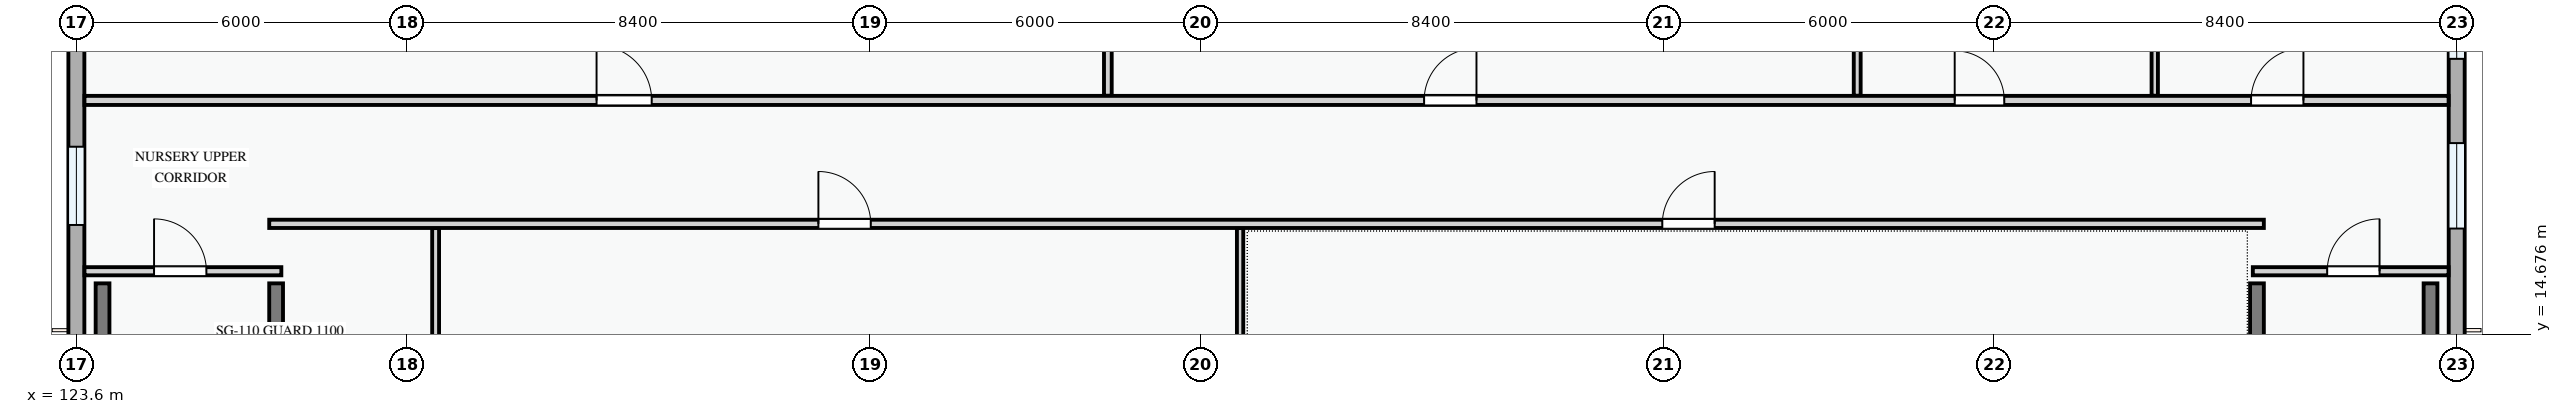
"""IFC4 building model, lengths in metres.
Left out: names, types, materials, properties, quantities, classifications, styles, units other than length and angle.
Written with IfcOpenShell. Run it as: python <this file> out.ifc"""

import sys

from ifc_helpers import new_model, si_unit, direction, frame, frame_2d, origin, place, context, subcontext, project, spatial, rectangle, extrude, element, fill, save


model = new_model("IFC4")
c1 = context("Model", 3, precision=1e-05, world=origin(), true_north=direction((0.0, 1.0)))
c2 = subcontext(c1, "Body", "Model", "MODEL_VIEW")
j1 = project(units=[si_unit("LENGTHUNIT", "METRE"), si_unit("PLANEANGLEUNIT", "RADIAN")], contexts=[c1])
p1 = place(None, origin())
s1 = spatial("IfcSite", under=j1, at=p1, CompositionType="ELEMENT")
p2 = place(p1, origin())
s2 = spatial("IfcBuilding", under=s1, at=p2, CompositionType="ELEMENT")
p3 = place(p2, frame((0.0, 0.0, 4.5)))
s3 = spatial("IfcBuildingStorey", under=s2, at=p3, CompositionType="ELEMENT", Elevation=4.5)
p4 = place(p3, frame((166.8, 14.4, 0.0), z_axis=(0.0, 0.0, 1.0), x_axis=(0.0, 1.0, 0.0)))
e1 = element("IfcWall", 1, at=p4, inside=s3, PredefinedType="STANDARD", context=c2, shape_type="SweptSolid", body=[
    extrude(rectangle(XDim=8.4, YDim=0.29, at=frame_2d((4.2, 0.0))), origin(), (0.0, 0.0, 1.0), 2.725),
])
p5 = place(p4, frame((2.195, 0.0, 0.72)))
e2 = element("IfcOpeningElement", 2, at=p5, cuts=e1, PredefinedType="OPENING", context=c2, shape_type="SweptSolid", body=[
    extrude(rectangle(XDim=1.55, YDim=1.4, at=frame_2d((0.775, 0.7))), frame((0.0, 0.155, 0.0), z_axis=(0.0, -1.0, 0.0), x_axis=(1.0, 0.0, 0.0)), (0.0, 0.0, 1.0), 0.31),
])
p6 = place(p4, frame((5.275, 0.0, 0.72)))
e3 = element("IfcOpeningElement", 3, at=p6, cuts=e1, PredefinedType="OPENING", context=c2, shape_type="SweptSolid", body=[
    extrude(rectangle(XDim=2.18, YDim=1.48, at=frame_2d((1.09, 0.74))), frame((0.0, 0.155, 0.0), z_axis=(0.0, -1.0, 0.0), x_axis=(1.0, 0.0, 0.0)), (0.0, 0.0, 1.0), 0.31),
])
p7 = place(p3, frame((123.6, 22.8, 0.0), z_axis=(0.0, 0.0, 1.0), x_axis=(0.0, -1.0, 0.0)))
e4 = element("IfcWall", 4, at=p7, inside=s3, PredefinedType="STANDARD", context=c2, shape_type="SweptSolid", body=[
    extrude(rectangle(XDim=8.4, YDim=0.29, at=frame_2d((4.2, 0.0))), origin(), (0.0, 0.0, 1.0), 2.725),
])
p8 = place(p7, frame((1.485, 0.0, 0.72)))
e5 = element("IfcOpeningElement", 5, at=p8, cuts=e4, PredefinedType="OPENING", context=c2, shape_type="SweptSolid", body=[
    extrude(rectangle(XDim=1.1, YDim=1.3, at=frame_2d((0.55, 0.65))), frame((0.0, 0.155, 0.0), z_axis=(0.0, -1.0, 0.0), x_axis=(1.0, 0.0, 0.0)), (0.0, 0.0, 1.0), 0.31),
])
p9 = place(p7, frame((4.72, 0.0, 0.72)))
e6 = element("IfcOpeningElement", 6, at=p9, cuts=e4, PredefinedType="OPENING", context=c2, shape_type="SweptSolid", body=[
    extrude(rectangle(XDim=1.42, YDim=1.38, at=frame_2d((0.71, 0.69))), frame((0.0, 0.155, 0.0), z_axis=(0.0, -1.0, 0.0), x_axis=(1.0, 0.0, 0.0)), (0.0, 0.0, 1.0), 0.31),
])
for number, where, z_axis, x_axis in (
    (7, (124.075, 15.6, 0.0), (0.0, 0.0, 1.0), (0.0, -1.0, 0.0)),
    (8, (127.225, 15.6, 0.0), (0.0, 0.0, 1.0), (0.0, -1.0, 0.0)),
    (9, (163.175, 15.6, 0.0), (0.0, 0.0, 1.0), (0.0, -1.0, 0.0)),
    (10, (166.325, 15.6, 0.0), (0.0, 0.0, 1.0), (0.0, -1.0, 0.0)),
):
    element("IfcWall", number, at=place(p3, frame(where, z_axis=z_axis, x_axis=x_axis)), inside=s3, PredefinedType="SHEAR", context=c2, shape_type="SweptSolid", body=[
        extrude(rectangle(XDim=6.7, YDim=0.25, at=frame_2d((3.35, 0.0))), origin(), (0.0, 0.0, 1.0), 3.3),
    ])
p10 = place(p3, frame((130.12, 8.547, 0.0), z_axis=(0.0, 0.0, 1.0), x_axis=(0.0, 1.0, 0.0)))
e11 = element("IfcWall", 11, at=p10, inside=s3, PredefinedType="PARTITIONING", context=c2, shape_type="SweptSolid", body=[
    extrude(rectangle(XDim=8.056, YDim=0.125, at=frame_2d((4.028, 0.0))), origin(), (0.0, 0.0, 1.0), 3.3),
])
p11 = place(p3, frame((144.72, 8.547, 0.0), z_axis=(0.0, 0.0, 1.0), x_axis=(0.0, 1.0, 0.0)))
e12 = element("IfcWall", 12, at=p11, inside=s3, PredefinedType="PARTITIONING", context=c2, shape_type="SweptSolid", body=[
    extrude(rectangle(XDim=8.056, YDim=0.115, at=frame_2d((4.028, 0.0))), origin(), (0.0, 0.0, 1.0), 3.3),
])
p12 = place(p3, frame((142.32, 19.004, 0.0), z_axis=(0.0, 0.0, 1.0), x_axis=(0.0, 1.0, 0.0)))
e13 = element("IfcWall", 13, at=p12, inside=s3, PredefinedType="PARTITIONING", context=c2, shape_type="SweptSolid", body=[
    extrude(rectangle(XDim=9.736, YDim=0.14, at=frame_2d((4.868, 0.0))), origin(), (0.0, 0.0, 1.0), 3.3),
])
p13 = place(p3, frame((155.92, 19.004, 0.0), z_axis=(0.0, 0.0, 1.0), x_axis=(0.0, 1.0, 0.0)))
e14 = element("IfcWall", 14, at=p13, inside=s3, PredefinedType="PARTITIONING", context=c2, shape_type="SweptSolid", body=[
    extrude(rectangle(XDim=9.736, YDim=0.125, at=frame_2d((4.868, 0.0))), origin(), (0.0, 0.0, 1.0), 3.3),
])
p14 = place(p3, frame((161.32, 19.004, 0.0), z_axis=(0.0, 0.0, 1.0), x_axis=(0.0, 1.0, 0.0)))
e15 = element("IfcWall", 15, at=p14, inside=s3, PredefinedType="PARTITIONING", context=c2, shape_type="SweptSolid", body=[
    extrude(rectangle(XDim=9.649, YDim=0.115, at=frame_2d((4.824, 0.0))), origin(), (0.0, 0.0, 1.0), 3.3),
])
p15 = place(p3, frame((127.1, 16.68, 0.0), z_axis=(0.0, 0.0, 1.0), x_axis=(1.0, 0.0, 0.0)))
e16 = element("IfcWall", 16, at=p15, inside=s3, PredefinedType="PARTITIONING", context=c2, shape_type="SweptSolid", body=[
    extrude(rectangle(XDim=36.2, YDim=0.15, at=frame_2d((18.1, 0.0))), origin(), (0.0, 0.0, 1.0), 3.3),
])
p16 = place(p15, frame((9.967, 0.0, 0.0)))
e17 = element("IfcOpeningElement", 17, at=p16, cuts=e16, PredefinedType="OPENING", context=c2, shape_type="SweptSolid", body=[
    extrude(rectangle(XDim=0.95, YDim=2.1, at=frame_2d((0.475, 1.05))), frame((0.0, 0.085, 0.0), z_axis=(0.0, -1.0, 0.0), x_axis=(1.0, 0.0, 0.0)), (0.0, 0.0, 1.0), 0.17),
])
p17 = place(p15, frame((25.283, 0.0, 0.0)))
e18 = element("IfcOpeningElement", 18, at=p17, cuts=e16, PredefinedType="OPENING", context=c2, shape_type="SweptSolid", body=[
    extrude(rectangle(XDim=0.95, YDim=2.1, at=frame_2d((0.475, 1.05))), frame((0.0, 0.085, 0.0), z_axis=(0.0, -1.0, 0.0), x_axis=(1.0, 0.0, 0.0)), (0.0, 0.0, 1.0), 0.17),
])
p18 = place(p3, frame((123.747, 18.92, 0.0), z_axis=(0.0, 0.0, 1.0), x_axis=(1.0, 0.0, 0.0)))
e19 = element("IfcWall", 19, at=p18, inside=s3, PredefinedType="PARTITIONING", context=c2, shape_type="SweptSolid", body=[
    extrude(rectangle(XDim=42.906, YDim=0.165, at=frame_2d((21.453, 0.0))), origin(), (0.0, 0.0, 1.0), 3.3),
])
p19 = place(p18, frame((9.294, 0.0, 0.0)))
e20 = element("IfcOpeningElement", 20, at=p19, cuts=e19, PredefinedType="OPENING", context=c2, shape_type="SweptSolid", body=[
    extrude(rectangle(XDim=1.0, YDim=2.1, at=frame_2d((0.5, 1.05))), frame((0.0, 0.093, 0.0), z_axis=(0.0, -1.0, 0.0), x_axis=(1.0, 0.0, 0.0)), (0.0, 0.0, 1.0), 0.185),
])
p20 = place(p18, frame((24.313, 0.0, 0.0)))
e21 = element("IfcOpeningElement", 21, at=p20, cuts=e19, PredefinedType="OPENING", context=c2, shape_type="SweptSolid", body=[
    extrude(rectangle(XDim=0.95, YDim=2.1, at=frame_2d((0.475, 1.05))), frame((0.0, 0.093, 0.0), z_axis=(0.0, -1.0, 0.0), x_axis=(1.0, 0.0, 0.0)), (0.0, 0.0, 1.0), 0.185),
])
p21 = place(p18, frame((33.942, 0.0, 0.0)))
e22 = element("IfcOpeningElement", 22, at=p21, cuts=e19, PredefinedType="OPENING", context=c2, shape_type="SweptSolid", body=[
    extrude(rectangle(XDim=0.9, YDim=2.1, at=frame_2d((0.45, 1.05))), frame((0.0, 0.093, 0.0), z_axis=(0.0, -1.0, 0.0), x_axis=(1.0, 0.0, 0.0)), (0.0, 0.0, 1.0), 0.185),
])
p22 = place(p18, frame((39.322, 0.0, 0.0)))
e23 = element("IfcOpeningElement", 23, at=p22, cuts=e19, PredefinedType="OPENING", context=c2, shape_type="SweptSolid", body=[
    extrude(rectangle(XDim=0.95, YDim=2.1, at=frame_2d((0.475, 1.05))), frame((0.0, 0.093, 0.0), z_axis=(0.0, -1.0, 0.0), x_axis=(1.0, 0.0, 0.0)), (0.0, 0.0, 1.0), 0.185),
])
p23 = place(p3, frame((123.747, 15.82, 0.0), z_axis=(0.0, 0.0, 1.0), x_axis=(1.0, 0.0, 0.0)))
e24 = element("IfcWall", 24, at=p23, inside=s3, PredefinedType="PARTITIONING", context=c2, shape_type="SweptSolid", body=[
    extrude(rectangle(XDim=3.573, YDim=0.148, at=frame_2d((1.787, 0.0))), origin(), (0.0, 0.0, 1.0), 3.3),
])
p24 = place(p23, frame((1.263, 0.0, 0.0)))
e25 = element("IfcOpeningElement", 25, at=p24, cuts=e24, PredefinedType="OPENING", context=c2, shape_type="SweptSolid", body=[
    extrude(rectangle(XDim=0.95, YDim=2.1, at=frame_2d((0.475, 1.05))), frame((0.0, 0.084, 0.0), z_axis=(0.0, -1.0, 0.0), x_axis=(1.0, 0.0, 0.0)), (0.0, 0.0, 1.0), 0.168),
])
p25 = place(p3, frame((163.1, 15.82, 0.0), z_axis=(0.0, 0.0, 1.0), x_axis=(1.0, 0.0, 0.0)))
e26 = element("IfcWall", 26, at=p25, inside=s3, PredefinedType="PARTITIONING", context=c2, shape_type="SweptSolid", body=[
    extrude(rectangle(XDim=3.553, YDim=0.148, at=frame_2d((1.776, 0.0))), origin(), (0.0, 0.0, 1.0), 3.3),
])
p26 = place(p25, frame((1.35, 0.0, 0.0)))
e27 = element("IfcOpeningElement", 27, at=p26, cuts=e26, PredefinedType="OPENING", context=c2, shape_type="SweptSolid", body=[
    extrude(rectangle(XDim=0.95, YDim=2.1, at=frame_2d((0.475, 1.05))), frame((0.0, 0.084, 0.0), z_axis=(0.0, -1.0, 0.0), x_axis=(1.0, 0.0, 0.0)), (0.0, 0.0, 1.0), 0.168),
])
p27 = place(p5, origin())
e28 = element("IfcWindow", 28, at=p27, inside=s3, PartitioningType="SINGLE_PANEL", PredefinedType="WINDOW", context=c2, shape_type="SweptSolid", body=[
    extrude(rectangle(XDim=1.55, YDim=1.4, at=frame_2d((0.775, 0.7))), frame((0.0, 0.03, 0.0), z_axis=(0.0, -1.0, 0.0), x_axis=(1.0, 0.0, 0.0)), (0.0, 0.0, 1.0), 0.06),
])
fill(e2, e28)
p28 = place(p6, origin())
e29 = element("IfcWindow", 29, at=p28, inside=s3, PartitioningType="DOUBLE_PANEL_VERTICAL", PredefinedType="WINDOW", context=c2, shape_type="SweptSolid", body=[
    extrude(rectangle(XDim=2.18, YDim=1.48, at=frame_2d((1.09, 0.74))), frame((0.0, 0.03, 0.0), z_axis=(0.0, -1.0, 0.0), x_axis=(1.0, 0.0, 0.0)), (0.0, 0.0, 1.0), 0.06),
])
fill(e3, e29)
p29 = place(p9, origin())
e30 = element("IfcWindow", 30, at=p29, inside=s3, PartitioningType="SINGLE_PANEL", PredefinedType="WINDOW", context=c2, shape_type="SweptSolid", body=[
    extrude(rectangle(XDim=1.42, YDim=1.38, at=frame_2d((0.71, 0.69))), frame((0.0, 0.03, 0.0), z_axis=(0.0, -1.0, 0.0), x_axis=(1.0, 0.0, 0.0)), (0.0, 0.0, 1.0), 0.06),
])
fill(e6, e30)
p30 = place(p16, origin())
e31 = element("IfcDoor", 31, at=p30, inside=s3, OperationType="SINGLE_SWING_LEFT", PredefinedType="DOOR", context=c2, shape_type="SweptSolid", body=[
    extrude(rectangle(XDim=0.95, YDim=2.1, at=frame_2d((0.475, 1.05))), frame((0.0, 0.025, 0.0), z_axis=(0.0, -1.0, 0.0), x_axis=(1.0, 0.0, 0.0)), (0.0, 0.0, 1.0), 0.05),
])
fill(e17, e31)
p31 = place(p17, origin())
e32 = element("IfcDoor", 32, at=p31, inside=s3, OperationType="SINGLE_SWING_RIGHT", PredefinedType="DOOR", context=c2, shape_type="SweptSolid", body=[
    extrude(rectangle(XDim=0.95, YDim=2.1, at=frame_2d((0.475, 1.05))), frame((0.0, 0.025, 0.0), z_axis=(0.0, -1.0, 0.0), x_axis=(1.0, 0.0, 0.0)), (0.0, 0.0, 1.0), 0.05),
])
fill(e18, e32)
p32 = place(p19, origin())
e33 = element("IfcDoor", 33, at=p32, inside=s3, OperationType="SINGLE_SWING_LEFT", PredefinedType="DOOR", context=c2, shape_type="SweptSolid", body=[
    extrude(rectangle(XDim=1.0, YDim=2.1, at=frame_2d((0.5, 1.05))), frame((0.0, 0.025, 0.0), z_axis=(0.0, -1.0, 0.0), x_axis=(1.0, 0.0, 0.0)), (0.0, 0.0, 1.0), 0.05),
])
fill(e20, e33)
p33 = place(p20, origin())
e34 = element("IfcDoor", 34, at=p33, inside=s3, OperationType="SINGLE_SWING_RIGHT", PredefinedType="DOOR", context=c2, shape_type="SweptSolid", body=[
    extrude(rectangle(XDim=0.95, YDim=2.1, at=frame_2d((0.475, 1.05))), frame((0.0, 0.025, 0.0), z_axis=(0.0, -1.0, 0.0), x_axis=(1.0, 0.0, 0.0)), (0.0, 0.0, 1.0), 0.05),
])
fill(e21, e34)
p34 = place(p21, origin())
e35 = element("IfcDoor", 35, at=p34, inside=s3, OperationType="SINGLE_SWING_LEFT", PredefinedType="DOOR", context=c2, shape_type="SweptSolid", body=[
    extrude(rectangle(XDim=0.9, YDim=2.1, at=frame_2d((0.45, 1.05))), frame((0.0, 0.025, 0.0), z_axis=(0.0, -1.0, 0.0), x_axis=(1.0, 0.0, 0.0)), (0.0, 0.0, 1.0), 0.05),
])
fill(e22, e35)
p35 = place(p22, origin())
e36 = element("IfcDoor", 36, at=p35, inside=s3, OperationType="SINGLE_SWING_RIGHT", PredefinedType="DOOR", context=c2, shape_type="SweptSolid", body=[
    extrude(rectangle(XDim=0.95, YDim=2.1, at=frame_2d((0.475, 1.05))), frame((0.0, 0.025, 0.0), z_axis=(0.0, -1.0, 0.0), x_axis=(1.0, 0.0, 0.0)), (0.0, 0.0, 1.0), 0.05),
])
fill(e23, e36)
p36 = place(p24, origin())
e37 = element("IfcDoor", 37, at=p36, inside=s3, OperationType="SINGLE_SWING_LEFT", PredefinedType="DOOR", context=c2, shape_type="SweptSolid", body=[
    extrude(rectangle(XDim=0.95, YDim=2.1, at=frame_2d((0.475, 1.05))), frame((0.0, 0.025, 0.0), z_axis=(0.0, -1.0, 0.0), x_axis=(1.0, 0.0, 0.0)), (0.0, 0.0, 1.0), 0.05),
])
fill(e25, e37)
p37 = place(p26, origin())
e38 = element("IfcDoor", 38, at=p37, inside=s3, OperationType="SINGLE_SWING_RIGHT", PredefinedType="DOOR", context=c2, shape_type="SweptSolid", body=[
    extrude(rectangle(XDim=0.95, YDim=2.1, at=frame_2d((0.475, 1.05))), frame((0.0, 0.025, 0.0), z_axis=(0.0, -1.0, 0.0), x_axis=(1.0, 0.0, 0.0)), (0.0, 0.0, 1.0), 0.05),
])
fill(e27, e38)
save(model, sys.argv[1])
